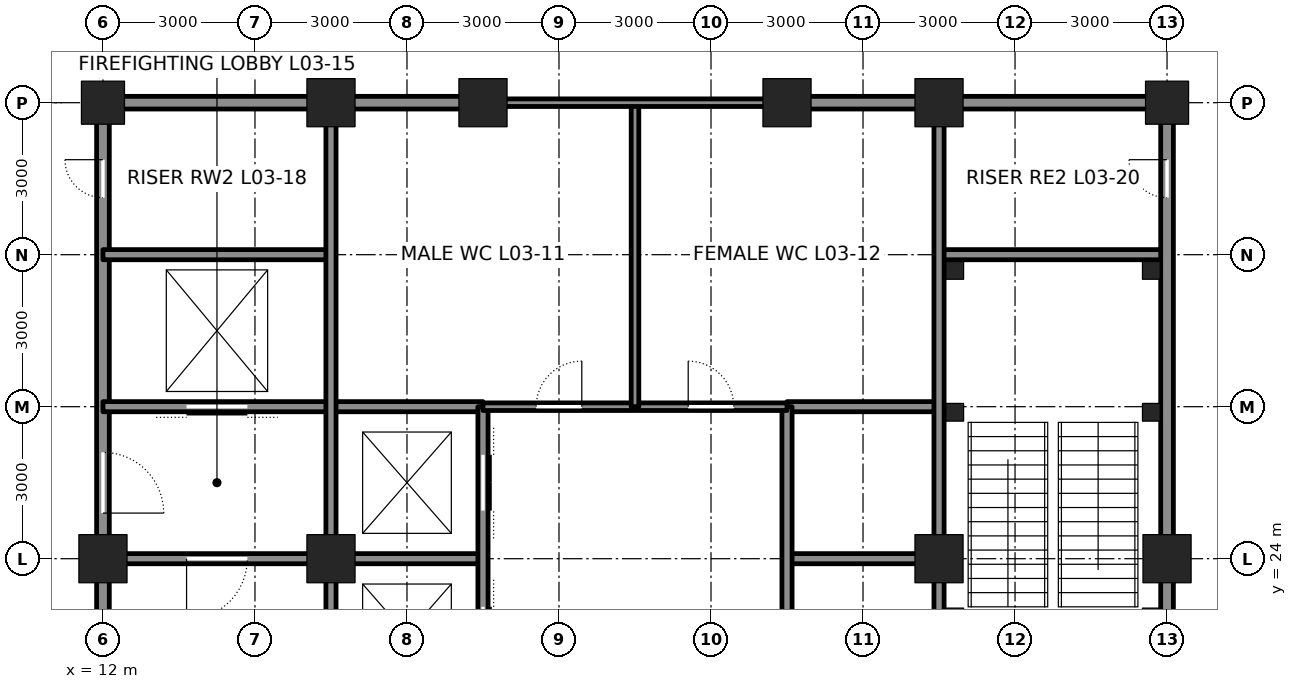
"""IFC4 building model, lengths in metres.
Left out: names, types, materials, properties, quantities, classifications, styles, units other than length and angle.
Written with IfcOpenShell. Run it as: python <this file> out.ifc"""

import sys

from ifc_helpers import new_model, si_unit, direction, frame, frame_2d, origin, origin_2d, place, context, subcontext, project, spatial, rectangle, hollow_rectangle, extrude, element, fill, save


model = new_model("IFC4")
c1 = context("Model", 3, precision=1e-05, world=origin(), true_north=direction((0.0, 1.0)))
c2 = subcontext(c1, "Body", "Model", "MODEL_VIEW")
j1 = project(units=[si_unit("LENGTHUNIT", "METRE"), si_unit("PLANEANGLEUNIT", "RADIAN")], contexts=[c1])
p1 = place(None, origin())
s1 = spatial("IfcSite", under=j1, at=p1, CompositionType="ELEMENT")
p2 = place(p1, origin())
s2 = spatial("IfcBuilding", under=s1, at=p2, CompositionType="ELEMENT")
p3 = place(p2, frame((0.0, 0.0, 19.5)))
s3 = spatial("IfcBuildingStorey", under=s2, at=p3, CompositionType="ELEMENT", Elevation=19.5)
p4 = place(p3, frame((12.0, 33.0, 0.0), z_axis=(0.0, 0.0, 1.0), x_axis=(1.0, 0.0, 0.0)))
e1 = element("IfcColumn", 1, at=p4, inside=s3, PredefinedType="COLUMN", context=c2, shape_type="SweptSolid", body=[
    extrude(hollow_rectangle(XDim=0.85, YDim=0.85, WallThickness=0.085, at=origin_2d()), origin(), (0.0, 0.0, 1.0), 4.8),
])
for number, where, z_axis, x_axis in (
    (2, (16.5, 33.0, 0.0), (0.0, 0.0, 1.0), (1.0, 0.0, 0.0)),
    (3, (19.5, 33.0, 0.0), (0.0, 0.0, 1.0), (1.0, 0.0, 0.0)),
    (4, (25.5, 33.0, 0.0), (0.0, 0.0, 1.0), (1.0, 0.0, 0.0)),
    (5, (28.5, 33.0, 0.0), (0.0, 0.0, 1.0), (1.0, 0.0, 0.0)),
):
    element("IfcColumn", number, at=place(p3, frame(where, z_axis=z_axis, x_axis=x_axis)), inside=s3, PredefinedType="COLUMN", context=c2, shape_type="SweptSolid", body=[
        extrude(hollow_rectangle(XDim=0.95, YDim=0.95, WallThickness=0.095, at=origin_2d()), origin(), (0.0, 0.0, 1.0), 4.8),
    ])
p5 = place(p3, frame((33.0, 33.0, 0.0), z_axis=(0.0, 0.0, 1.0), x_axis=(1.0, 0.0, 0.0)))
e6 = element("IfcColumn", 6, at=p5, inside=s3, PredefinedType="COLUMN", context=c2, shape_type="SweptSolid", body=[
    extrude(hollow_rectangle(XDim=0.85, YDim=0.85, WallThickness=0.085, at=origin_2d()), origin(), (0.0, 0.0, 1.0), 4.8),
])
for number, where, z_axis, x_axis in (
    (7, (12.0, 24.0, 0.0), (0.0, 0.0, 1.0), (1.0, 0.0, 0.0)),
    (8, (33.0, 24.0, 0.0), (0.0, 0.0, 1.0), (1.0, 0.0, 0.0)),
    (9, (16.5, 24.0, 0.0), (0.0, 0.0, 1.0), (1.0, 0.0, 0.0)),
    (10, (28.5, 24.0, 0.0), (0.0, 0.0, 1.0), (1.0, 0.0, 0.0)),
):
    element("IfcColumn", number, at=place(p3, frame(where, z_axis=z_axis, x_axis=x_axis)), inside=s3, PredefinedType="COLUMN", context=c2, shape_type="SweptSolid", body=[
        extrude(hollow_rectangle(XDim=0.95, YDim=0.95, WallThickness=0.095, at=origin_2d()), origin(), (0.0, 0.0, 1.0), 4.8),
    ])
p6 = place(p3, frame((12.0, 21.25, 0.0), z_axis=(0.0, 0.0, 1.0), x_axis=(0.0, 1.0, 0.0)))
e11 = element("IfcWall", 11, at=p6, inside=s3, PredefinedType="SOLIDWALL", context=c2, shape_type="SweptSolid", body=[
    extrude(rectangle(XDim=2.5, YDim=0.25, at=frame_2d((1.25, 0.0))), origin(), (0.0, 0.0, 1.0), 3.413),
])
p7 = place(p3, frame((12.0, 24.25, 0.0), z_axis=(0.0, 0.0, 1.0), x_axis=(0.0, 1.0, 0.0)))
e12 = element("IfcWall", 12, at=p7, inside=s3, PredefinedType="SOLIDWALL", context=c2, shape_type="SweptSolid", body=[
    extrude(rectangle(XDim=8.5, YDim=0.25, at=frame_2d((4.25, 0.0))), origin(), (0.0, 0.0, 1.0), 3.413),
])
p8 = place(p7, frame((0.65, 0.0, 0.0)))
e13 = element("IfcOpeningElement", 13, at=p8, cuts=e12, PredefinedType="OPENING", context=c2, shape_type="SweptSolid", body=[
    extrude(rectangle(XDim=1.2, YDim=2.1, at=frame_2d((0.6, 1.05))), frame((0.0, 0.135, 0.0), z_axis=(0.0, -1.0, 0.0), x_axis=(1.0, 0.0, 0.0)), (0.0, 0.0, 1.0), 0.27),
])
p9 = place(p7, frame((6.875, 0.0, 0.0)))
e14 = element("IfcOpeningElement", 14, at=p9, cuts=e12, PredefinedType="OPENING", context=c2, shape_type="SweptSolid", body=[
    extrude(rectangle(XDim=0.75, YDim=2.1, at=frame_2d((0.375, 1.05))), frame((0.0, 0.135, 0.0), z_axis=(0.0, -1.0, 0.0), x_axis=(1.0, 0.0, 0.0)), (0.0, 0.0, 1.0), 0.27),
])
p10 = place(p3, frame((12.25, 24.0, 0.0), z_axis=(0.0, 0.0, 1.0), x_axis=(1.0, 0.0, 0.0)))
e15 = element("IfcWall", 15, at=p10, inside=s3, PredefinedType="SOLIDWALL", context=c2, shape_type="SweptSolid", body=[
    extrude(rectangle(XDim=4.0, YDim=0.2, at=frame_2d((2.0, 0.0))), origin(), (0.0, 0.0, 1.0), 3.69),
])
p11 = place(p10, frame((1.4, 0.0, 0.0)))
e16 = element("IfcOpeningElement", 16, at=p11, cuts=e15, PredefinedType="OPENING", context=c2, shape_type="SweptSolid", body=[
    extrude(rectangle(XDim=1.2, YDim=2.1, at=frame_2d((0.6, 1.05))), frame((0.0, 0.11, 0.0), z_axis=(0.0, -1.0, 0.0), x_axis=(1.0, 0.0, 0.0)), (0.0, 0.0, 1.0), 0.22),
])
for number, where, z_axis, x_axis in (
    (17, (16.75, 24.0, 0.0), (0.0, 0.0, 1.0), (1.0, 0.0, 0.0)),
    (18, (25.5, 24.0, 0.0), (0.0, 0.0, 1.0), (1.0, 0.0, 0.0)),
):
    element("IfcWall", number, at=place(p3, frame(where, z_axis=z_axis, x_axis=x_axis)), inside=s3, PredefinedType="SOLIDWALL", context=c2, shape_type="SweptSolid", body=[
        extrude(rectangle(XDim=2.75, YDim=0.2, at=frame_2d((1.375, 0.0))), origin(), (0.0, 0.0, 1.0), 3.69),
    ])
p12 = place(p3, frame((12.0, 27.0, 0.0), z_axis=(0.0, 0.0, 1.0), x_axis=(1.0, 0.0, 0.0)))
e19 = element("IfcWall", 19, at=p12, inside=s3, PredefinedType="SOLIDWALL", context=c2, shape_type="SweptSolid", body=[
    extrude(rectangle(XDim=7.5, YDim=0.2, at=frame_2d((3.75, 0.0))), origin(), (0.0, 0.0, 1.0), 4.64),
])
p13 = place(p12, frame((1.65, 0.0, 0.0)))
e20 = element("IfcOpeningElement", 20, at=p13, cuts=e19, PredefinedType="OPENING", context=c2, shape_type="SweptSolid", body=[
    extrude(rectangle(XDim=1.2, YDim=2.1, at=frame_2d((0.6, 1.05))), frame((0.0, 0.11, 0.0), z_axis=(0.0, -1.0, 0.0), x_axis=(1.0, 0.0, 0.0)), (0.0, 0.0, 1.0), 0.22),
])
p14 = place(p3, frame((25.5, 27.0, 0.0), z_axis=(0.0, 0.0, 1.0), x_axis=(1.0, 0.0, 0.0)))
e21 = element("IfcWall", 21, at=p14, inside=s3, PredefinedType="SOLIDWALL", context=c2, shape_type="SweptSolid", body=[
    extrude(rectangle(XDim=3.0, YDim=0.2, at=frame_2d((1.5, 0.0))), origin(), (0.0, 0.0, 1.0), 4.64),
])
for number, where, z_axis, x_axis in (
    (22, (12.0, 30.0, 0.0), (0.0, 0.0, 1.0), (1.0, 0.0, 0.0)),
    (23, (28.5, 30.0, 0.0), (0.0, 0.0, 1.0), (1.0, 0.0, 0.0)),
):
    element("IfcWall", number, at=place(p3, frame(where, z_axis=z_axis, x_axis=x_axis)), inside=s3, PredefinedType="SOLIDWALL", context=c2, shape_type="SweptSolid", body=[
        extrude(rectangle(XDim=4.5, YDim=0.2, at=frame_2d((2.25, 0.0))), origin(), (0.0, 0.0, 1.0), 4.64),
    ])
p15 = place(p3, frame((12.25, 33.0, 0.0), z_axis=(0.0, 0.0, 1.0), x_axis=(1.0, 0.0, 0.0)))
e24 = element("IfcWall", 24, at=p15, inside=s3, PredefinedType="SOLIDWALL", context=c2, shape_type="SweptSolid", body=[
    extrude(rectangle(XDim=4.0, YDim=0.25, at=frame_2d((2.0, 0.0))), origin(), (0.0, 0.0, 1.0), 3.481),
])
for number, where, z_axis, x_axis in (
    (25, (16.75, 33.0, 0.0), (0.0, 0.0, 1.0), (1.0, 0.0, 0.0)),
    (26, (25.75, 33.0, 0.0), (0.0, 0.0, 1.0), (1.0, 0.0, 0.0)),
):
    element("IfcWall", number, at=place(p3, frame(where, z_axis=z_axis, x_axis=x_axis)), inside=s3, PredefinedType="SOLIDWALL", context=c2, shape_type="SweptSolid", body=[
        extrude(rectangle(XDim=2.5, YDim=0.25, at=frame_2d((1.25, 0.0))), origin(), (0.0, 0.0, 1.0), 3.481),
    ])
p16 = place(p3, frame((28.75, 33.0, 0.0), z_axis=(0.0, 0.0, 1.0), x_axis=(1.0, 0.0, 0.0)))
e27 = element("IfcWall", 27, at=p16, inside=s3, PredefinedType="SOLIDWALL", context=c2, shape_type="SweptSolid", body=[
    extrude(rectangle(XDim=4.0, YDim=0.25, at=frame_2d((2.0, 0.0))), origin(), (0.0, 0.0, 1.0), 3.481),
])
p17 = place(p3, frame((16.5, 21.25, 0.0), z_axis=(0.0, 0.0, 1.0), x_axis=(0.0, 1.0, 0.0)))
e28 = element("IfcWall", 28, at=p17, inside=s3, PredefinedType="SOLIDWALL", context=c2, shape_type="SweptSolid", body=[
    extrude(rectangle(XDim=2.5, YDim=0.2, at=frame_2d((1.25, 0.0))), origin(), (0.0, 0.0, 1.0), 3.713),
])
p18 = place(p3, frame((16.5, 24.25, 0.0), z_axis=(0.0, 0.0, 1.0), x_axis=(0.0, 1.0, 0.0)))
e29 = element("IfcWall", 29, at=p18, inside=s3, PredefinedType="SOLIDWALL", context=c2, shape_type="SweptSolid", body=[
    extrude(rectangle(XDim=8.5, YDim=0.2, at=frame_2d((4.25, 0.0))), origin(), (0.0, 0.0, 1.0), 3.713),
])
p19 = place(p3, frame((19.5, 15.0, 0.0), z_axis=(0.0, 0.0, 1.0), x_axis=(0.0, 1.0, 0.0)))
e30 = element("IfcWall", 30, at=p19, inside=s3, PredefinedType="SOLIDWALL", context=c2, shape_type="SweptSolid", body=[
    extrude(rectangle(XDim=12.0, YDim=0.2, at=frame_2d((6.0, 0.0))), origin(), (0.0, 0.0, 1.0), 3.665),
])
p20 = place(p19, frame((0.95, 0.0, 0.0)))
e31 = element("IfcOpeningElement", 31, at=p20, cuts=e30, PredefinedType="OPENING", context=c2, shape_type="SweptSolid", body=[
    extrude(rectangle(XDim=1.1, YDim=2.1, at=frame_2d((0.55, 1.05))), frame((0.0, 0.11, 0.0), z_axis=(0.0, -1.0, 0.0), x_axis=(1.0, 0.0, 0.0)), (0.0, 0.0, 1.0), 0.22),
])
p21 = place(p19, frame((3.95, 0.0, 0.0)))
e32 = element("IfcOpeningElement", 32, at=p21, cuts=e30, PredefinedType="OPENING", context=c2, shape_type="SweptSolid", body=[
    extrude(rectangle(XDim=1.1, YDim=2.1, at=frame_2d((0.55, 1.05))), frame((0.0, 0.11, 0.0), z_axis=(0.0, -1.0, 0.0), x_axis=(1.0, 0.0, 0.0)), (0.0, 0.0, 1.0), 0.22),
])
p22 = place(p19, frame((6.95, 0.0, 0.0)))
e33 = element("IfcOpeningElement", 33, at=p22, cuts=e30, PredefinedType="OPENING", context=c2, shape_type="SweptSolid", body=[
    extrude(rectangle(XDim=1.1, YDim=2.1, at=frame_2d((0.55, 1.05))), frame((0.0, 0.11, 0.0), z_axis=(0.0, -1.0, 0.0), x_axis=(1.0, 0.0, 0.0)), (0.0, 0.0, 1.0), 0.22),
])
p23 = place(p19, frame((9.95, 0.0, 0.0)))
e34 = element("IfcOpeningElement", 34, at=p23, cuts=e30, PredefinedType="OPENING", context=c2, shape_type="SweptSolid", body=[
    extrude(rectangle(XDim=1.1, YDim=2.1, at=frame_2d((0.55, 1.05))), frame((0.0, 0.11, 0.0), z_axis=(0.0, -1.0, 0.0), x_axis=(1.0, 0.0, 0.0)), (0.0, 0.0, 1.0), 0.22),
])
p24 = place(p3, frame((25.5, 15.0, 0.0), z_axis=(0.0, 0.0, 1.0), x_axis=(0.0, 1.0, 0.0)))
e35 = element("IfcWall", 35, at=p24, inside=s3, PredefinedType="SOLIDWALL", context=c2, shape_type="SweptSolid", body=[
    extrude(rectangle(XDim=12.0, YDim=0.2, at=frame_2d((6.0, 0.0))), origin(), (0.0, 0.0, 1.0), 3.665),
])
p25 = place(p3, frame((28.5, 21.25, 0.0), z_axis=(0.0, 0.0, 1.0), x_axis=(0.0, 1.0, 0.0)))
e36 = element("IfcWall", 36, at=p25, inside=s3, PredefinedType="SOLIDWALL", context=c2, shape_type="SweptSolid", body=[
    extrude(rectangle(XDim=2.5, YDim=0.2, at=frame_2d((1.25, 0.0))), origin(), (0.0, 0.0, 1.0), 3.713),
])
p26 = place(p3, frame((28.5, 24.25, 0.0), z_axis=(0.0, 0.0, 1.0), x_axis=(0.0, 1.0, 0.0)))
e37 = element("IfcWall", 37, at=p26, inside=s3, PredefinedType="SOLIDWALL", context=c2, shape_type="SweptSolid", body=[
    extrude(rectangle(XDim=8.5, YDim=0.2, at=frame_2d((4.25, 0.0))), origin(), (0.0, 0.0, 1.0), 3.713),
])
p27 = place(p3, frame((33.0, 21.25, 0.0), z_axis=(0.0, 0.0, 1.0), x_axis=(0.0, 1.0, 0.0)))
e38 = element("IfcWall", 38, at=p27, inside=s3, PredefinedType="SOLIDWALL", context=c2, shape_type="SweptSolid", body=[
    extrude(rectangle(XDim=2.5, YDim=0.25, at=frame_2d((1.25, 0.0))), origin(), (0.0, 0.0, 1.0), 3.413),
])
p28 = place(p3, frame((33.0, 24.25, 0.0), z_axis=(0.0, 0.0, 1.0), x_axis=(0.0, 1.0, 0.0)))
e39 = element("IfcWall", 39, at=p28, inside=s3, PredefinedType="SOLIDWALL", context=c2, shape_type="SweptSolid", body=[
    extrude(rectangle(XDim=8.5, YDim=0.25, at=frame_2d((4.25, 0.0))), origin(), (0.0, 0.0, 1.0), 3.413),
])
p29 = place(p28, frame((6.875, 0.0, 0.0)))
e40 = element("IfcOpeningElement", 40, at=p29, cuts=e39, PredefinedType="OPENING", context=c2, shape_type="SweptSolid", body=[
    extrude(rectangle(XDim=0.75, YDim=2.1, at=frame_2d((0.375, 1.05))), frame((0.0, 0.135, 0.0), z_axis=(0.0, -1.0, 0.0), x_axis=(1.0, 0.0, 0.0)), (0.0, 0.0, 1.0), 0.27),
])
p30 = place(p3, frame((19.5, 27.0, 0.0), z_axis=(0.0, 0.0, 1.0), x_axis=(1.0, 0.0, 0.0)))
e41 = element("IfcWall", 41, at=p30, inside=s3, PredefinedType="PARTITIONING", context=c2, shape_type="SweptSolid", body=[
    extrude(rectangle(XDim=6.0, YDim=0.15, at=frame_2d((3.0, 0.0))), origin(), (0.0, 0.0, 1.0), 4.64),
])
p31 = place(p30, frame((1.05, 0.0, 0.0)))
e42 = element("IfcOpeningElement", 42, at=p31, cuts=e41, PredefinedType="OPENING", context=c2, shape_type="SweptSolid", body=[
    extrude(rectangle(XDim=0.9, YDim=2.1, at=frame_2d((0.45, 1.05))), frame((0.0, 0.085, 0.0), z_axis=(0.0, -1.0, 0.0), x_axis=(1.0, 0.0, 0.0)), (0.0, 0.0, 1.0), 0.17),
])
p32 = place(p30, frame((4.05, 0.0, 0.0)))
e43 = element("IfcOpeningElement", 43, at=p32, cuts=e41, PredefinedType="OPENING", context=c2, shape_type="SweptSolid", body=[
    extrude(rectangle(XDim=0.9, YDim=2.1, at=frame_2d((0.45, 1.05))), frame((0.0, 0.085, 0.0), z_axis=(0.0, -1.0, 0.0), x_axis=(1.0, 0.0, 0.0)), (0.0, 0.0, 1.0), 0.17),
])
p33 = place(p3, frame((22.5, 27.0, 0.0), z_axis=(0.0, 0.0, 1.0), x_axis=(0.0, 1.0, 0.0)))
e44 = element("IfcWall", 44, at=p33, inside=s3, PredefinedType="PARTITIONING", context=c2, shape_type="SweptSolid", body=[
    extrude(rectangle(XDim=6.0, YDim=0.15, at=frame_2d((3.0, 0.0))), origin(), (0.0, 0.0, 1.0), 4.64),
])
p34 = place(p3, frame((19.5, 33.0, 0.0), z_axis=(0.0, 0.0, 1.0), x_axis=(1.0, 0.0, 0.0)))
e45 = element("IfcWall", 45, at=p34, inside=s3, PredefinedType="PARTITIONING", context=c2, shape_type="SweptSolid", body=[
    extrude(rectangle(XDim=6.0, YDim=0.15, at=frame_2d((3.0, 0.0))), origin(), (0.0, 0.0, 1.0), 3.481),
])
for number, where, z_axis, x_axis in (
    (46, (28.81, 29.69, 0.0), (0.0, 0.0, 1.0), (1.0, 0.0, 0.0)),
    (47, (32.69, 29.69, 0.0), (0.0, 0.0, 1.0), (1.0, 0.0, 0.0)),
    (48, (28.81, 26.89, 0.0), (0.0, 0.0, 1.0), (1.0, 0.0, 0.0)),
    (49, (32.69, 26.89, 0.0), (0.0, 0.0, 1.0), (1.0, 0.0, 0.0)),
    (50, (28.81, 22.85, 0.0), (0.0, 0.0, 1.0), (1.0, 0.0, 0.0)),
    (51, (32.69, 22.85, 0.0), (0.0, 0.0, 1.0), (1.0, 0.0, 0.0)),
):
    element("IfcColumn", number, at=place(p3, frame(where, z_axis=z_axis, x_axis=x_axis)), inside=s3, PredefinedType="COLUMN", context=c2, shape_type="SweptSolid", body=[
        extrude(hollow_rectangle(XDim=0.35, YDim=0.35, WallThickness=0.035, at=origin_2d()), origin(), (0.0, 0.0, 1.0), 4.8),
    ])
p35 = place(p11, frame((1.2, 0.0, 0.0), z_axis=(0.0, 0.0, 1.0), x_axis=(-1.0, 0.0, 0.0)))
e52 = element("IfcDoor", 52, at=p35, inside=s3, OperationType="SINGLE_SWING_RIGHT", PredefinedType="DOOR", context=c2, shape_type="SweptSolid", body=[
    extrude(rectangle(XDim=1.2, YDim=2.1, at=frame_2d((0.6, 1.05))), frame((0.0, 0.025, 0.0), z_axis=(0.0, -1.0, 0.0), x_axis=(1.0, 0.0, 0.0)), (0.0, 0.0, 1.0), 0.05),
])
fill(e16, e52)
p36 = place(p8, frame((1.2, 0.0, 0.0), z_axis=(0.0, 0.0, 1.0), x_axis=(-1.0, 0.0, 0.0)))
e53 = element("IfcDoor", 53, at=p36, inside=s3, OperationType="SINGLE_SWING_RIGHT", PredefinedType="DOOR", context=c2, shape_type="SweptSolid", body=[
    extrude(rectangle(XDim=1.2, YDim=2.1, at=frame_2d((0.6, 1.05))), frame((0.0, 0.025, 0.0), z_axis=(0.0, -1.0, 0.0), x_axis=(1.0, 0.0, 0.0)), (0.0, 0.0, 1.0), 0.05),
])
fill(e13, e53)
p37 = place(p13, origin())
e54 = element("IfcDoor", 54, at=p37, inside=s3, OperationType="DOUBLE_DOOR_SLIDING", PredefinedType="DOOR", context=c2, shape_type="SweptSolid", body=[
    extrude(rectangle(XDim=1.2, YDim=2.1, at=frame_2d((0.6, 1.05))), frame((0.0, 0.025, 0.0), z_axis=(0.0, -1.0, 0.0), x_axis=(1.0, 0.0, 0.0)), (0.0, 0.0, 1.0), 0.05),
])
fill(e20, e54)
p38 = place(p9, origin())
e55 = element("IfcDoor", 55, at=p38, inside=s3, OperationType="SINGLE_SWING_RIGHT", PredefinedType="DOOR", context=c2, shape_type="SweptSolid", body=[
    extrude(rectangle(XDim=0.75, YDim=2.1, at=frame_2d((0.375, 1.05))), frame((0.0, 0.025, 0.0), z_axis=(0.0, -1.0, 0.0), x_axis=(1.0, 0.0, 0.0)), (0.0, 0.0, 1.0), 0.05),
])
fill(e14, e55)
p39 = place(p29, origin())
e56 = element("IfcDoor", 56, at=p39, inside=s3, OperationType="SINGLE_SWING_RIGHT", PredefinedType="DOOR", context=c2, shape_type="SweptSolid", body=[
    extrude(rectangle(XDim=0.75, YDim=2.1, at=frame_2d((0.375, 1.05))), frame((0.0, 0.025, 0.0), z_axis=(0.0, -1.0, 0.0), x_axis=(1.0, 0.0, 0.0)), (0.0, 0.0, 1.0), 0.05),
])
fill(e40, e56)
p40 = place(p31, origin())
e57 = element("IfcDoor", 57, at=p40, inside=s3, OperationType="SINGLE_SWING_RIGHT", PredefinedType="DOOR", context=c2, shape_type="SweptSolid", body=[
    extrude(rectangle(XDim=0.9, YDim=2.1, at=frame_2d((0.45, 1.05))), frame((0.0, 0.025, 0.0), z_axis=(0.0, -1.0, 0.0), x_axis=(1.0, 0.0, 0.0)), (0.0, 0.0, 1.0), 0.05),
])
fill(e42, e57)
p41 = place(p32, origin())
e58 = element("IfcDoor", 58, at=p41, inside=s3, OperationType="SINGLE_SWING_LEFT", PredefinedType="DOOR", context=c2, shape_type="SweptSolid", body=[
    extrude(rectangle(XDim=0.9, YDim=2.1, at=frame_2d((0.45, 1.05))), frame((0.0, 0.025, 0.0), z_axis=(0.0, -1.0, 0.0), x_axis=(1.0, 0.0, 0.0)), (0.0, 0.0, 1.0), 0.05),
])
fill(e43, e58)
p42 = place(p22, origin())
e59 = element("IfcDoor", 59, at=p42, inside=s3, OperationType="DOUBLE_DOOR_SLIDING", PredefinedType="DOOR", context=c2, shape_type="SweptSolid", body=[
    extrude(rectangle(XDim=1.1, YDim=2.1, at=frame_2d((0.55, 1.05))), frame((0.0, 0.025, 0.0), z_axis=(0.0, -1.0, 0.0), x_axis=(1.0, 0.0, 0.0)), (0.0, 0.0, 1.0), 0.05),
])
fill(e33, e59)
p43 = place(p23, origin())
e60 = element("IfcDoor", 60, at=p43, inside=s3, OperationType="DOUBLE_DOOR_SLIDING", PredefinedType="DOOR", context=c2, shape_type="SweptSolid", body=[
    extrude(rectangle(XDim=1.1, YDim=2.1, at=frame_2d((0.55, 1.05))), frame((0.0, 0.025, 0.0), z_axis=(0.0, -1.0, 0.0), x_axis=(1.0, 0.0, 0.0)), (0.0, 0.0, 1.0), 0.05),
])
fill(e34, e60)
save(model, sys.argv[1])
